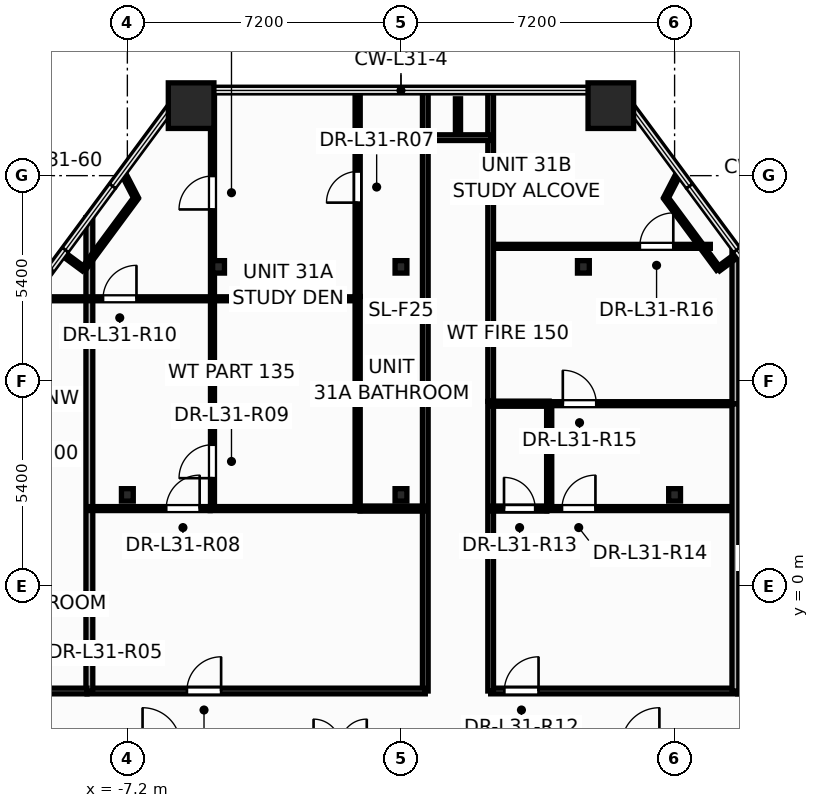
"""IFC4 building model, lengths in metres.
Left out: names, types, materials, properties, quantities, classifications, styles, units other than length and angle.
Written with IfcOpenShell. Run it as: python <this file> out.ifc"""

import sys

from ifc_helpers import new_model, si_unit, direction, frame, frame_2d, origin, origin_2d, place, context, subcontext, project, spatial, rectangle, hollow_rectangle, i_section, extrude, element, fill, save


model = new_model("IFC4")
c1 = context("Model", 3, precision=1e-05, world=origin(), true_north=direction((0.0, 1.0)))
c2 = subcontext(c1, "Body", "Model", "MODEL_VIEW")
j1 = project(units=[si_unit("LENGTHUNIT", "METRE"), si_unit("PLANEANGLEUNIT", "RADIAN")], contexts=[c1])
p1 = place(None, origin())
s1 = spatial("IfcSite", under=j1, at=p1, CompositionType="ELEMENT")
p2 = place(p1, origin())
s2 = spatial("IfcBuilding", under=s1, at=p2, CompositionType="ELEMENT")
p3 = place(p2, frame((0.0, 0.0, 122.1)))
s3 = spatial("IfcBuildingStorey", under=s2, at=p3, CompositionType="ELEMENT", Elevation=122.1)
for number, where, z_axis, x_axis in (
    (1, (5.522, 12.642, 0.0), (0.0, 0.0, 1.0), (1.0, 0.0, 0.0)),
    (2, (-5.522, 12.642, 0.0), (0.0, 0.0, 1.0), (1.0, 0.0, 0.0)),
):
    element("IfcColumn", number, at=place(p3, frame(where, z_axis=z_axis, x_axis=x_axis)), inside=s3, PredefinedType="COLUMN", context=c2, shape_type="SweptSolid", body=[
        extrude(hollow_rectangle(XDim=1.2, YDim=1.2, WallThickness=0.055, at=origin_2d()), origin(), (0.0, 0.0, 1.0), 3.6),
    ])
for number, where, z_axis, x_axis in (
    (3, (-7.2, 2.4, 0.0), (0.0, 0.0, 1.0), (1.0, 0.0, 0.0)),
    (4, (0.0, 2.4, 0.0), (0.0, 0.0, 1.0), (1.0, 0.0, 0.0)),
    (5, (7.2, 2.4, 0.0), (0.0, 0.0, 1.0), (1.0, 0.0, 0.0)),
    (6, (-4.8, 8.4, 0.0), (0.0, 0.0, 1.0), (1.0, 0.0, 0.0)),
    (7, (0.0, 8.4, 0.0), (0.0, 0.0, 1.0), (1.0, 0.0, 0.0)),
    (8, (4.8, 8.4, 0.0), (0.0, 0.0, 1.0), (1.0, 0.0, 0.0)),
):
    element("IfcColumn", number, at=place(p3, frame(where, z_axis=z_axis, x_axis=x_axis)), inside=s3, PredefinedType="COLUMN", context=c2, shape_type="SweptSolid", body=[
        extrude(i_section(OverallWidth=0.311, OverallDepth=0.327, WebThickness=0.016, FlangeThickness=0.025, at=origin_2d()), origin(), (0.0, 0.0, 1.0), 3.6),
    ])
p4 = place(p3, frame((0.64, -2.76, 0.0), z_axis=(0.0, 0.0, 1.0), x_axis=(0.0, 1.0, 0.0)))
e9 = element("IfcWall", 9, at=p4, inside=s3, PredefinedType="PARTITIONING", context=c2, shape_type="SweptSolid", body=[
    extrude(rectangle(XDim=15.802, YDim=0.15, at=frame_2d((7.901, 0.0))), origin(), (0.0, 0.0, 1.0), 2.325),
])
p5 = place(p3, frame((-8.26, -2.76, 0.0), z_axis=(0.0, 0.0, 1.0), x_axis=(1.0, 0.0, 0.0)))
e10 = element("IfcWall", 10, at=p5, inside=s3, PredefinedType="PARTITIONING", context=c2, shape_type="SweptSolid", body=[
    extrude(rectangle(XDim=8.9, YDim=0.15, at=frame_2d((4.45, 0.0))), origin(), (0.0, 0.0, 1.0), 2.325),
])
p6 = place(p5, frame((2.627, 0.0, 0.0)))
e11 = element("IfcOpeningElement", 11, at=p6, cuts=e10, PredefinedType="OPENING", context=c2, shape_type="SweptSolid", body=[
    extrude(rectangle(XDim=0.906, YDim=2.104, at=frame_2d((0.45, 1.052))), frame((0.0, 0.085, 0.0), z_axis=(0.0, -1.0, 0.0), x_axis=(1.0, 0.0, 0.0)), (0.0, 0.0, 1.0), 0.17),
])
p7 = place(p3, frame((-8.2, -2.76, 0.0), z_axis=(0.0, 0.0, 1.0), x_axis=(0.0, 1.0, 0.0)))
e12 = element("IfcWall", 12, at=p7, inside=s3, PredefinedType="PARTITIONING", context=c2, shape_type="SweptSolid", body=[
    extrude(rectangle(XDim=12.454, YDim=0.18, at=frame_2d((6.227, 0.0))), origin(), (0.0, 0.0, 1.0), 2.617),
])
p8 = place(p3, frame((-14.64, -2.76, 0.0), z_axis=(0.0, 0.0, 1.0), x_axis=(1.0, 0.0, 0.0)))
e13 = element("IfcWall", 13, at=p8, inside=s3, PredefinedType="PARTITIONING", context=c2, shape_type="SweptSolid", body=[
    extrude(rectangle(XDim=6.378, YDim=0.15, at=frame_2d((3.189, 0.0))), origin(), (0.0, 0.0, 1.0), 3.35),
])
p9 = place(p8, frame((3.8, 0.0, 0.0)))
e14 = element("IfcOpeningElement", 14, at=p9, cuts=e13, PredefinedType="OPENING", context=c2, shape_type="SweptSolid", body=[
    extrude(rectangle(XDim=0.906, YDim=2.104, at=frame_2d((0.45, 1.052))), frame((0.0, 0.085, 0.0), z_axis=(0.0, -1.0, 0.0), x_axis=(1.0, 0.0, 0.0)), (0.0, 0.0, 1.0), 0.17),
])
p10 = place(p3, frame((2.36, -2.76, 0.0), z_axis=(0.0, 0.0, 1.0), x_axis=(1.0, 0.0, 0.0)))
e15 = element("IfcWall", 15, at=p10, inside=s3, PredefinedType="PARTITIONING", context=c2, shape_type="SweptSolid", body=[
    extrude(rectangle(XDim=6.5, YDim=0.15, at=frame_2d((3.25, 0.0))), origin(), (0.0, 0.0, 1.0), 2.325),
])
p11 = place(p10, frame((0.36, 0.0, 0.0)))
e16 = element("IfcOpeningElement", 16, at=p11, cuts=e15, PredefinedType="OPENING", context=c2, shape_type="SweptSolid", body=[
    extrude(rectangle(XDim=0.906, YDim=2.104, at=frame_2d((0.45, 1.052))), frame((0.0, 0.085, 0.0), z_axis=(0.0, -1.0, 0.0), x_axis=(1.0, 0.0, 0.0)), (0.0, 0.0, 1.0), 0.17),
])
p12 = place(p3, frame((8.862, -2.76, 0.0), z_axis=(0.0, 0.0, 1.0), x_axis=(1.0, 0.0, 0.0)))
e17 = element("IfcWall", 17, at=p12, inside=s3, PredefinedType="PARTITIONING", context=c2, shape_type="SweptSolid", body=[
    extrude(rectangle(XDim=5.778, YDim=0.15, at=frame_2d((2.889, 0.0))), origin(), (0.0, 0.0, 1.0), 3.35),
])
p13 = place(p12, frame((0.278, 0.0, 0.0)))
e18 = element("IfcOpeningElement", 18, at=p13, cuts=e17, PredefinedType="OPENING", context=c2, shape_type="SweptSolid", body=[
    extrude(rectangle(XDim=0.906, YDim=2.104, at=frame_2d((0.45, 1.052))), frame((0.0, 0.085, 0.0), z_axis=(0.0, -1.0, 0.0), x_axis=(1.0, 0.0, 0.0)), (0.0, 0.0, 1.0), 0.17),
])
p14 = place(p3, frame((2.36, 8.94, 0.0), z_axis=(0.0, 0.0, 1.0), x_axis=(1.0, 0.0, 0.0)))
e19 = element("IfcWall", 19, at=p14, inside=s3, PredefinedType="PARTITIONING", context=c2, shape_type="SweptSolid", body=[
    extrude(rectangle(XDim=5.78, YDim=0.105, at=frame_2d((2.89, 0.0))), origin(), (0.0, 0.0, 1.0), 2.617),
])
p15 = place(p14, frame((3.926, 0.0, 0.0)))
e20 = element("IfcOpeningElement", 20, at=p15, cuts=e19, PredefinedType="OPENING", context=c2, shape_type="SweptSolid", body=[
    extrude(rectangle(XDim=0.886, YDim=2.104, at=frame_2d((0.44, 1.052))), frame((0.0, 0.062, 0.0), z_axis=(0.0, -1.0, 0.0), x_axis=(1.0, 0.0, 0.0)), (0.0, 0.0, 1.0), 0.125),
])
p16 = place(p3, frame((-1.14, 2.04, 0.0), z_axis=(0.0, 0.0, 1.0), x_axis=(0.0, 1.0, 0.0)))
e21 = element("IfcWall", 21, at=p16, inside=s3, PredefinedType="PARTITIONING", context=c2, shape_type="SweptSolid", body=[
    extrude(rectangle(XDim=5.58, YDim=0.135, at=frame_2d((2.79, 0.0))), origin(), (0.0, 0.0, 1.0), 2.325),
])
p17 = place(p3, frame((-1.14, 7.622, 0.0), z_axis=(0.0, 0.0, 1.0), x_axis=(0.0, 1.0, 0.0)))
e22 = element("IfcWall", 22, at=p17, inside=s3, PredefinedType="PARTITIONING", context=c2, shape_type="SweptSolid", body=[
    extrude(rectangle(XDim=5.42, YDim=0.135, at=frame_2d((2.71, 0.0))), origin(), (0.0, 0.0, 1.0), 2.617),
])
p18 = place(p17, frame((2.468, 0.0, 0.0)))
e23 = element("IfcOpeningElement", 23, at=p18, cuts=e22, PredefinedType="OPENING", context=c2, shape_type="SweptSolid", body=[
    extrude(rectangle(XDim=0.826, YDim=2.104, at=frame_2d((0.41, 1.052))), frame((0.0, 0.078, 0.0), z_axis=(0.0, -1.0, 0.0), x_axis=(1.0, 0.0, 0.0)), (0.0, 0.0, 1.0), 0.155),
])
p19 = place(p3, frame((-4.96, 2.04, 0.0), z_axis=(0.0, 0.0, 1.0), x_axis=(0.0, 1.0, 0.0)))
e24 = element("IfcWall", 24, at=p19, inside=s3, PredefinedType="PARTITIONING", context=c2, shape_type="SweptSolid", body=[
    extrude(rectangle(XDim=5.52, YDim=0.105, at=frame_2d((2.76, 0.0))), origin(), (0.0, 0.0, 1.0), 2.325),
])
p20 = place(p19, frame((0.8, 0.0, 0.0)))
e25 = element("IfcOpeningElement", 25, at=p20, cuts=e24, PredefinedType="OPENING", context=c2, shape_type="SweptSolid", body=[
    extrude(rectangle(XDim=0.886, YDim=2.104, at=frame_2d((0.44, 1.052))), frame((0.0, 0.062, 0.0), z_axis=(0.0, -1.0, 0.0), x_axis=(1.0, 0.0, 0.0)), (0.0, 0.0, 1.0), 0.125),
])
p21 = place(p3, frame((-4.96, 7.56, 0.0), z_axis=(0.0, 0.0, 1.0), x_axis=(0.0, 1.0, 0.0)))
e26 = element("IfcWall", 26, at=p21, inside=s3, PredefinedType="PARTITIONING", context=c2, shape_type="SweptSolid", body=[
    extrude(rectangle(XDim=5.482, YDim=0.105, at=frame_2d((2.741, 0.0))), origin(), (0.0, 0.0, 1.0), 2.617),
])
p22 = place(p21, frame((2.351, 0.0, 0.0)))
e27 = element("IfcOpeningElement", 27, at=p22, cuts=e26, PredefinedType="OPENING", context=c2, shape_type="SweptSolid", body=[
    extrude(rectangle(XDim=0.886, YDim=2.104, at=frame_2d((0.44, 1.052))), frame((0.0, 0.062, 0.0), z_axis=(0.0, -1.0, 0.0), x_axis=(1.0, 0.0, 0.0)), (0.0, 0.0, 1.0), 0.125),
])
p23 = place(p3, frame((3.84, 2.04, 0.0), z_axis=(0.0, 0.0, 1.0), x_axis=(1.0, 0.0, 0.0)))
e28 = element("IfcWall", 28, at=p23, inside=s3, PredefinedType="PARTITIONING", context=c2, shape_type="SweptSolid", body=[
    extrude(rectangle(XDim=4.96, YDim=0.105, at=frame_2d((2.48, 0.0))), origin(), (0.0, 0.0, 1.0), 2.325),
])
p24 = place(p23, frame((0.397, 0.0, 0.0)))
e29 = element("IfcOpeningElement", 29, at=p24, cuts=e28, PredefinedType="OPENING", context=c2, shape_type="SweptSolid", body=[
    extrude(rectangle(XDim=0.886, YDim=2.104, at=frame_2d((0.44, 1.052))), frame((0.0, 0.062, 0.0), z_axis=(0.0, -1.0, 0.0), x_axis=(1.0, 0.0, 0.0)), (0.0, 0.0, 1.0), 0.125),
])
p25 = place(p3, frame((3.9, 4.8, 0.0), z_axis=(0.0, 0.0, 1.0), x_axis=(1.0, 0.0, 0.0)))
e30 = element("IfcWall", 30, at=p25, inside=s3, PredefinedType="PARTITIONING", context=c2, shape_type="SweptSolid", body=[
    extrude(rectangle(XDim=4.9, YDim=0.105, at=frame_2d((2.45, 0.0))), origin(), (0.0, 0.0, 1.0), 2.617),
])
p26 = place(p25, frame((0.359, 0.0, 0.0)))
e31 = element("IfcOpeningElement", 31, at=p26, cuts=e30, PredefinedType="OPENING", context=c2, shape_type="SweptSolid", body=[
    extrude(rectangle(XDim=0.886, YDim=2.104, at=frame_2d((0.44, 1.052))), frame((0.0, 0.062, 0.0), z_axis=(0.0, -1.0, 0.0), x_axis=(1.0, 0.0, 0.0)), (0.0, 0.0, 1.0), 0.125),
])
p27 = place(p3, frame((2.36, -2.76, 0.0), z_axis=(0.0, 0.0, 1.0), x_axis=(0.0, 1.0, 0.0)))
e32 = element("IfcWall", 32, at=p27, inside=s3, PredefinedType="PARTITIONING", context=c2, shape_type="SweptSolid", body=[
    extrude(rectangle(XDim=7.62, YDim=0.15, at=frame_2d((3.81, 0.0))), origin(), (0.0, 0.0, 1.0), 2.325),
])
p28 = place(p3, frame((-9.779, 7.56, 0.0), z_axis=(0.0, 0.0, 1.0), x_axis=(1.0, 0.0, 0.0)))
e33 = element("IfcWall", 33, at=p28, inside=s3, PredefinedType="PARTITIONING", context=c2, shape_type="SweptSolid", body=[
    extrude(rectangle(XDim=4.819, YDim=0.105, at=frame_2d((2.409, 0.0))), origin(), (0.0, 0.0, 1.0), 2.617),
])
p29 = place(p28, frame((1.939, 0.0, 0.0)))
e34 = element("IfcOpeningElement", 34, at=p29, cuts=e33, PredefinedType="OPENING", context=c2, shape_type="SweptSolid", body=[
    extrude(rectangle(XDim=0.886, YDim=2.104, at=frame_2d((0.44, 1.052))), frame((0.0, 0.062, 0.0), z_axis=(0.0, -1.0, 0.0), x_axis=(1.0, 0.0, 0.0)), (0.0, 0.0, 1.0), 0.125),
])
p30 = place(p3, frame((8.8, -2.76, 0.0), z_axis=(0.0, 0.0, 1.0), x_axis=(0.0, 1.0, 0.0)))
e35 = element("IfcWall", 35, at=p30, inside=s3, PredefinedType="PARTITIONING", context=c2, shape_type="SweptSolid", body=[
    extrude(rectangle(XDim=7.56, YDim=0.18, at=frame_2d((3.78, 0.0))), origin(), (0.0, 0.0, 1.0), 2.617),
])
p31 = place(p3, frame((2.36, 4.862, 0.0), z_axis=(0.0, 0.0, 1.0), x_axis=(0.0, 1.0, 0.0)))
e36 = element("IfcWall", 36, at=p31, inside=s3, PredefinedType="PARTITIONING", context=c2, shape_type="SweptSolid", body=[
    extrude(rectangle(XDim=8.18, YDim=0.15, at=frame_2d((4.09, 0.0))), origin(), (0.0, 0.0, 1.0), 2.617),
])
p32 = place(p3, frame((8.8, 4.8, 0.0), z_axis=(0.0, 0.0, 1.0), x_axis=(0.0, 1.0, 0.0)))
e37 = element("IfcWall", 37, at=p32, inside=s3, PredefinedType="PARTITIONING", context=c2, shape_type="SweptSolid", body=[
    extrude(rectangle(XDim=4.1, YDim=0.18, at=frame_2d((2.05, 0.0))), origin(), (0.0, 0.0, 1.0), 2.617),
])
p33 = place(p3, frame((-5.02, 2.04, 0.0), z_axis=(0.0, 0.0, 1.0), x_axis=(1.0, 0.0, 0.0)))
e38 = element("IfcWall", 38, at=p33, inside=s3, PredefinedType="PARTITIONING", context=c2, shape_type="SweptSolid", body=[
    extrude(rectangle(XDim=3.94, YDim=0.105, at=frame_2d((1.97, 0.0))), origin(), (0.0, 0.0, 1.0), 2.918),
])
p34 = place(p3, frame((-4.96, 7.56, 0.0), z_axis=(0.0, 0.0, 1.0), x_axis=(1.0, 0.0, 0.0)))
e39 = element("IfcWall", 39, at=p34, inside=s3, PredefinedType="PARTITIONING", context=c2, shape_type="SweptSolid", body=[
    extrude(rectangle(XDim=3.82, YDim=0.105, at=frame_2d((1.91, 0.0))), origin(), (0.0, 0.0, 1.0), 2.617),
])
p35 = place(p3, frame((-8.2, 2.04, 0.0), z_axis=(0.0, 0.0, 1.0), x_axis=(1.0, 0.0, 0.0)))
e40 = element("IfcWall", 40, at=p35, inside=s3, PredefinedType="PARTITIONING", context=c2, shape_type="SweptSolid", body=[
    extrude(rectangle(XDim=3.178, YDim=0.105, at=frame_2d((1.589, 0.0))), origin(), (0.0, 0.0, 1.0), 2.325),
])
p36 = place(p35, frame((2.022, 0.0, 0.0)))
e41 = element("IfcOpeningElement", 41, at=p36, cuts=e40, PredefinedType="OPENING", context=c2, shape_type="SweptSolid", body=[
    extrude(rectangle(XDim=0.886, YDim=2.104, at=frame_2d((0.44, 1.052))), frame((0.0, 0.062, 0.0), z_axis=(0.0, -1.0, 0.0), x_axis=(1.0, 0.0, 0.0)), (0.0, 0.0, 1.0), 0.125),
])
p37 = place(p3, frame((3.9, 2.04, 0.0), z_axis=(0.0, 0.0, 1.0), x_axis=(0.0, 1.0, 0.0)))
e42 = element("IfcWall", 42, at=p37, inside=s3, PredefinedType="PARTITIONING", context=c2, shape_type="SweptSolid", body=[
    extrude(rectangle(XDim=2.76, YDim=0.135, at=frame_2d((1.38, 0.0))), origin(), (0.0, 0.0, 1.0), 2.325),
])
for number, where, z_axis, x_axis in (
    (43, (-6.971, 10.212, 0.0), (0.0, 0.0, 1.0), (-0.595, -0.804, 0.0)),
    (44, (8.353, 8.344, 0.0), (0.0, 0.0, 1.0), (-0.595, 0.804, 0.0)),
):
    element("IfcWall", number, at=place(p3, frame(where, z_axis=z_axis, x_axis=x_axis)), inside=s3, PredefinedType="PARTITIONING", context=c2, shape_type="SweptSolid", body=[
        extrude(rectangle(XDim=2.323, YDim=0.12, at=frame_2d((1.162, 0.0))), origin(), (0.0, 0.0, 1.0), 3.35),
    ])
p38 = place(p3, frame((-1.078, 2.04, 0.0), z_axis=(0.0, 0.0, 1.0), x_axis=(1.0, 0.0, 0.0)))
e45 = element("IfcWall", 45, at=p38, inside=s3, PredefinedType="PARTITIONING", context=c2, shape_type="SweptSolid", body=[
    extrude(rectangle(XDim=1.718, YDim=0.135, at=frame_2d((0.859, 0.0))), origin(), (0.0, 0.0, 1.0), 2.325),
])
p39 = place(p3, frame((2.36, 2.04, 0.0), z_axis=(0.0, 0.0, 1.0), x_axis=(1.0, 0.0, 0.0)))
e46 = element("IfcWall", 46, at=p39, inside=s3, PredefinedType="PARTITIONING", context=c2, shape_type="SweptSolid", body=[
    extrude(rectangle(XDim=1.478, YDim=0.135, at=frame_2d((0.739, 0.0))), origin(), (0.0, 0.0, 1.0), 2.918),
])
p40 = place(p39, frame((0.351, 0.0, 0.0)))
e47 = element("IfcOpeningElement", 47, at=p40, cuts=e46, PredefinedType="OPENING", context=c2, shape_type="SweptSolid", body=[
    extrude(rectangle(XDim=0.826, YDim=2.104, at=frame_2d((0.41, 1.052))), frame((0.0, 0.078, 0.0), z_axis=(0.0, -1.0, 0.0), x_axis=(1.0, 0.0, 0.0)), (0.0, 0.0, 1.0), 0.155),
])
p41 = place(p3, frame((2.36, 4.8, 0.0), z_axis=(0.0, 0.0, 1.0), x_axis=(1.0, 0.0, 0.0)))
e48 = element("IfcWall", 48, at=p41, inside=s3, PredefinedType="PARTITIONING", context=c2, shape_type="SweptSolid", body=[
    extrude(rectangle(XDim=1.54, YDim=0.135, at=frame_2d((0.77, 0.0))), origin(), (0.0, 0.0, 1.0), 2.918),
])
p42 = place(p3, frame((0.64, 11.8, 0.0), z_axis=(0.0, 0.0, 1.0), x_axis=(1.0, 0.0, 0.0)))
e49 = element("IfcWall", 49, at=p42, inside=s3, PredefinedType="PARTITIONING", context=c2, shape_type="SweptSolid", body=[
    extrude(rectangle(XDim=1.72, YDim=0.15, at=frame_2d((0.86, 0.0))), origin(), (0.0, 0.0, 1.0), 3.35),
])
for number, where, z_axis, x_axis in (
    (50, (-7.314, 10.875, 0.0), (0.0, 0.0, 1.0), (0.459, -0.888, 0.0)),
    (51, (6.971, 10.212, 0.0), (0.0, 0.0, 1.0), (0.459, 0.888, 0.0)),
):
    element("IfcWall", number, at=place(p3, frame(where, z_axis=z_axis, x_axis=x_axis)), inside=s3, PredefinedType="PARTITIONING", context=c2, shape_type="SweptSolid", body=[
        extrude(rectangle(XDim=0.747, YDim=0.12, at=frame_2d((0.373, 0.0))), origin(), (0.0, 0.0, 1.0), 2.792),
    ])
for number, where, z_axis, x_axis in (
    (52, (-8.353, 8.344, 0.0), (0.0, 0.0, 1.0), (-0.804, 0.595, 0.0)),
    (53, (8.891, 8.743, 0.0), (0.0, 0.0, 1.0), (-0.804, -0.595, 0.0)),
):
    element("IfcWall", number, at=place(p3, frame(where, z_axis=z_axis, x_axis=x_axis)), inside=s3, PredefinedType="PARTITIONING", context=c2, shape_type="SweptSolid", body=[
        extrude(rectangle(XDim=0.67, YDim=0.12, at=frame_2d((0.335, 0.0))), origin(), (0.0, 0.0, 1.0), 2.792),
    ])
p43 = place(p3, frame((1.5, 12.822, 0.0), z_axis=(0.0, 0.0, 1.0), x_axis=(0.0, -1.0, 0.0)))
e54 = element("IfcWall", 54, at=p43, inside=s3, PredefinedType="PARTITIONING", context=c2, shape_type="SweptSolid", body=[
    extrude(rectangle(XDim=0.882, YDim=0.135, at=frame_2d((0.441, 0.0))), origin(), (0.0, 0.0, 1.0), 2.792),
])
p44 = place(p6, origin())
e55 = element("IfcDoor", 55, at=p44, inside=s3, OperationType="SINGLE_SWING_RIGHT", PredefinedType="DOOR", context=c2, shape_type="SweptSolid", body=[
    extrude(rectangle(XDim=0.9, YDim=2.1, at=frame_2d((0.45, 1.05))), frame((0.0, 0.025, 0.0), z_axis=(0.0, -1.0, 0.0), x_axis=(1.0, 0.0, 0.0)), (0.0, 0.0, 1.0), 0.05),
])
fill(e11, e55)
p45 = place(p18, origin())
e56 = element("IfcDoor", 56, at=p45, inside=s3, OperationType="SINGLE_SWING_LEFT", PredefinedType="DOOR", context=c2, shape_type="SweptSolid", body=[
    extrude(rectangle(XDim=0.82, YDim=2.1, at=frame_2d((0.41, 1.05))), frame((0.0, 0.025, 0.0), z_axis=(0.0, -1.0, 0.0), x_axis=(1.0, 0.0, 0.0)), (0.0, 0.0, 1.0), 0.05),
])
fill(e23, e56)
p46 = place(p36, origin())
e57 = element("IfcDoor", 57, at=p46, inside=s3, OperationType="SINGLE_SWING_RIGHT", PredefinedType="DOOR", context=c2, shape_type="SweptSolid", body=[
    extrude(rectangle(XDim=0.88, YDim=2.1, at=frame_2d((0.44, 1.05))), frame((0.0, 0.025, 0.0), z_axis=(0.0, -1.0, 0.0), x_axis=(1.0, 0.0, 0.0)), (0.0, 0.0, 1.0), 0.05),
])
fill(e41, e57)
p47 = place(p20, origin())
e58 = element("IfcDoor", 58, at=p47, inside=s3, OperationType="SINGLE_SWING_LEFT", PredefinedType="DOOR", context=c2, shape_type="SweptSolid", body=[
    extrude(rectangle(XDim=0.88, YDim=2.1, at=frame_2d((0.44, 1.05))), frame((0.0, 0.025, 0.0), z_axis=(0.0, -1.0, 0.0), x_axis=(1.0, 0.0, 0.0)), (0.0, 0.0, 1.0), 0.05),
])
fill(e25, e58)
p48 = place(p29, origin())
e59 = element("IfcDoor", 59, at=p48, inside=s3, OperationType="SINGLE_SWING_RIGHT", PredefinedType="DOOR", context=c2, shape_type="SweptSolid", body=[
    extrude(rectangle(XDim=0.88, YDim=2.1, at=frame_2d((0.44, 1.05))), frame((0.0, 0.025, 0.0), z_axis=(0.0, -1.0, 0.0), x_axis=(1.0, 0.0, 0.0)), (0.0, 0.0, 1.0), 0.05),
])
fill(e34, e59)
p49 = place(p22, origin())
e60 = element("IfcDoor", 60, at=p49, inside=s3, OperationType="SINGLE_SWING_LEFT", PredefinedType="DOOR", context=c2, shape_type="SweptSolid", body=[
    extrude(rectangle(XDim=0.88, YDim=2.1, at=frame_2d((0.44, 1.05))), frame((0.0, 0.025, 0.0), z_axis=(0.0, -1.0, 0.0), x_axis=(1.0, 0.0, 0.0)), (0.0, 0.0, 1.0), 0.05),
])
fill(e27, e60)
p50 = place(p11, origin())
e61 = element("IfcDoor", 61, at=p50, inside=s3, OperationType="SINGLE_SWING_RIGHT", PredefinedType="DOOR", context=c2, shape_type="SweptSolid", body=[
    extrude(rectangle(XDim=0.9, YDim=2.1, at=frame_2d((0.45, 1.05))), frame((0.0, 0.025, 0.0), z_axis=(0.0, -1.0, 0.0), x_axis=(1.0, 0.0, 0.0)), (0.0, 0.0, 1.0), 0.05),
])
fill(e16, e61)
p51 = place(p40, origin())
e62 = element("IfcDoor", 62, at=p51, inside=s3, OperationType="SINGLE_SWING_LEFT", PredefinedType="DOOR", context=c2, shape_type="SweptSolid", body=[
    extrude(rectangle(XDim=0.82, YDim=2.1, at=frame_2d((0.41, 1.05))), frame((0.0, 0.025, 0.0), z_axis=(0.0, -1.0, 0.0), x_axis=(1.0, 0.0, 0.0)), (0.0, 0.0, 1.0), 0.05),
])
fill(e47, e62)
p52 = place(p24, origin())
e63 = element("IfcDoor", 63, at=p52, inside=s3, OperationType="SINGLE_SWING_RIGHT", PredefinedType="DOOR", context=c2, shape_type="SweptSolid", body=[
    extrude(rectangle(XDim=0.88, YDim=2.1, at=frame_2d((0.44, 1.05))), frame((0.0, 0.025, 0.0), z_axis=(0.0, -1.0, 0.0), x_axis=(1.0, 0.0, 0.0)), (0.0, 0.0, 1.0), 0.05),
])
fill(e29, e63)
p53 = place(p26, origin())
e64 = element("IfcDoor", 64, at=p53, inside=s3, OperationType="SINGLE_SWING_LEFT", PredefinedType="DOOR", context=c2, shape_type="SweptSolid", body=[
    extrude(rectangle(XDim=0.88, YDim=2.1, at=frame_2d((0.44, 1.05))), frame((0.0, 0.025, 0.0), z_axis=(0.0, -1.0, 0.0), x_axis=(1.0, 0.0, 0.0)), (0.0, 0.0, 1.0), 0.05),
])
fill(e31, e64)
p54 = place(p15, origin())
e65 = element("IfcDoor", 65, at=p54, inside=s3, OperationType="SINGLE_SWING_RIGHT", PredefinedType="DOOR", context=c2, shape_type="SweptSolid", body=[
    extrude(rectangle(XDim=0.88, YDim=2.1, at=frame_2d((0.44, 1.05))), frame((0.0, 0.025, 0.0), z_axis=(0.0, -1.0, 0.0), x_axis=(1.0, 0.0, 0.0)), (0.0, 0.0, 1.0), 0.05),
])
fill(e20, e65)
save(model, sys.argv[1])
